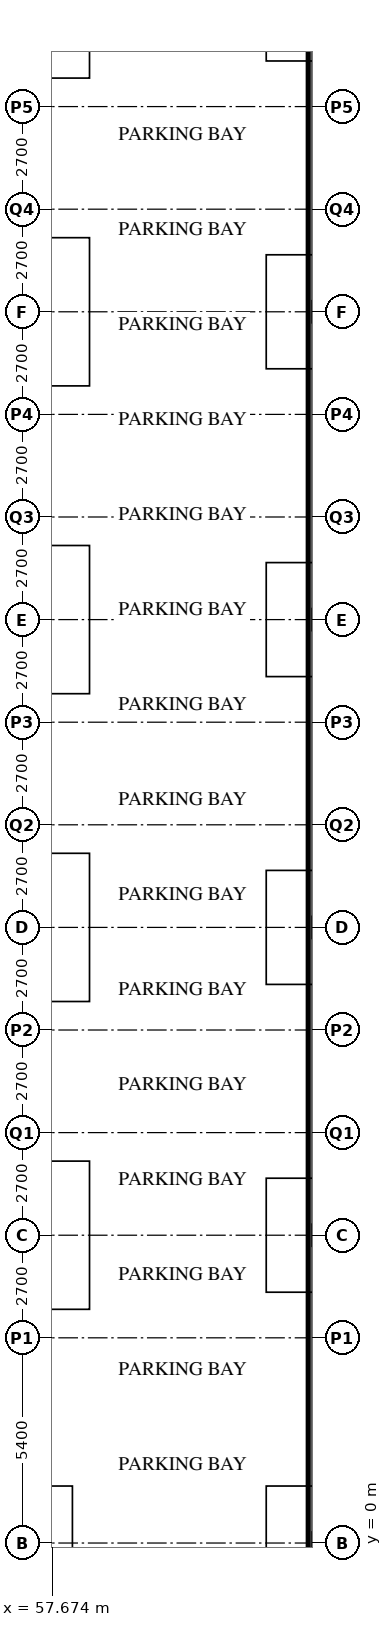
"""IFC4 building model, lengths in metres.
Left out: names, types, materials, properties, quantities, classifications, styles, units other than length and angle.
Written with IfcOpenShell. Run it as: python <this file> out.ifc"""

import sys

from ifc_helpers import new_model, si_unit, direction, frame, frame_2d, origin, place, context, subcontext, project, spatial, rectangle, extrude, element, save


model = new_model("IFC4")
c1 = context("Model", 3, precision=1e-05, world=origin(), true_north=direction((0.0, 1.0)))
c2 = subcontext(c1, "Body", "Model", "MODEL_VIEW")
j1 = project(units=[si_unit("LENGTHUNIT", "METRE"), si_unit("PLANEANGLEUNIT", "RADIAN")], contexts=[c1])
p1 = place(None, origin())
s1 = spatial("IfcSite", under=j1, at=p1, CompositionType="ELEMENT")
p2 = place(p1, origin())
s2 = spatial("IfcBuilding", under=s1, at=p2, CompositionType="ELEMENT")
p3 = place(p2, frame((0.0, 0.0, -8.4)))
s3 = spatial("IfcBuildingStorey", under=s2, at=p3, CompositionType="ELEMENT", Elevation=-8.4)
p4 = place(p3, frame((64.6, -7.9, 0.0), z_axis=(0.0, 0.0, 1.0), x_axis=(0.0, 1.0, 0.0)))
e1 = element("IfcWall", 1, at=p4, inside=s3, PredefinedType="SOLIDWALL", context=c2, shape_type="SweptSolid", body=[
    extrude(rectangle(XDim=56.3, YDim=0.4, at=frame_2d((28.15, 0.0))), origin(), (0.0, 0.0, 1.0), 3.338),
])
save(model, sys.argv[1])
